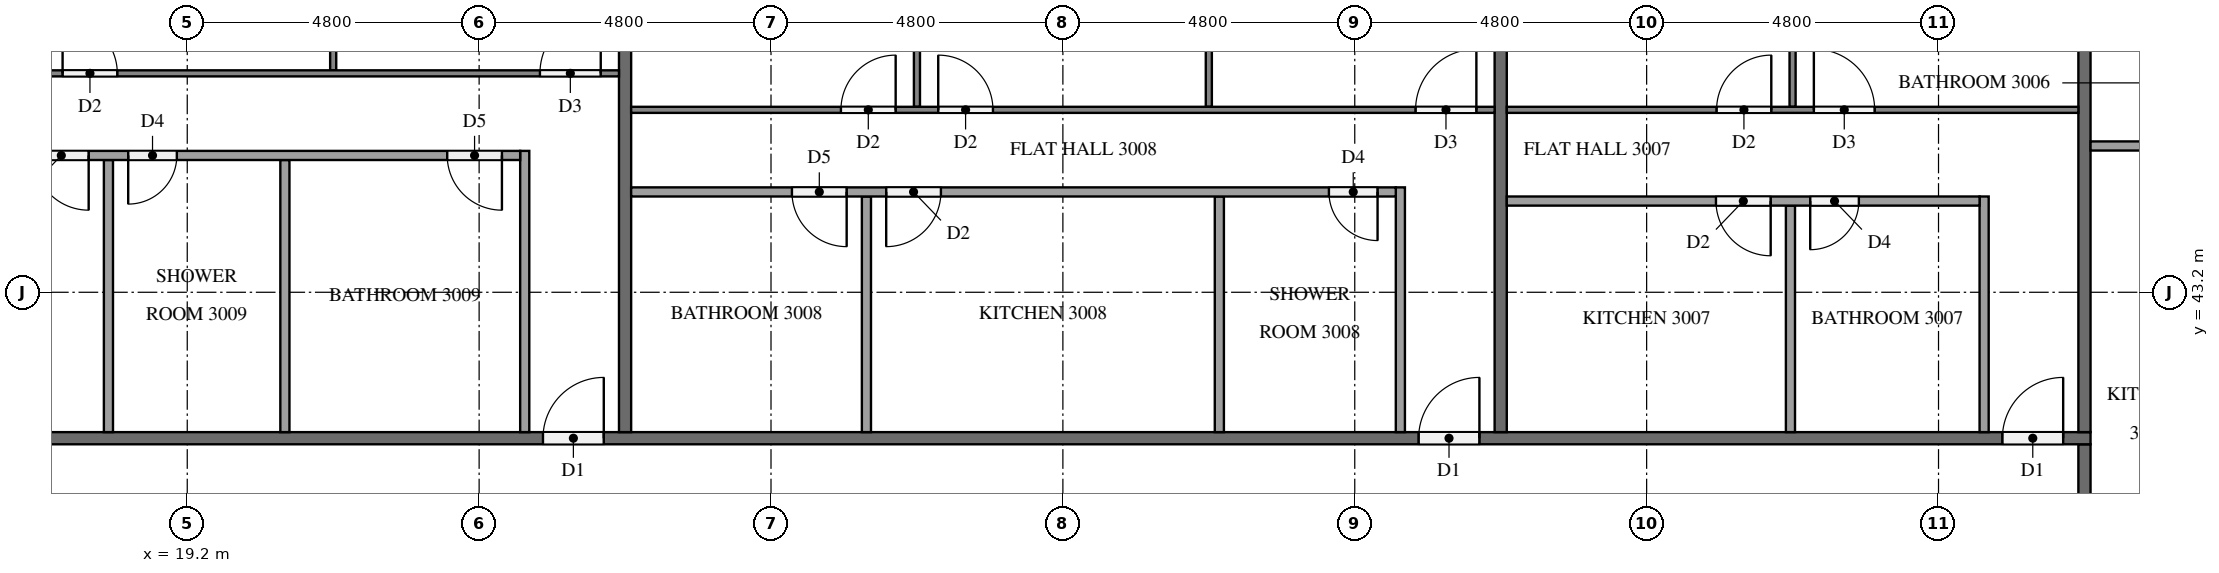
"""IFC4 building model, lengths in metres.
Left out: names, types, materials, properties, quantities, classifications, styles, units other than length and angle.
Written with IfcOpenShell. Run it as: python <this file> out.ifc"""

import sys

from ifc_helpers import new_model, si_unit, direction, frame, frame_2d, origin, place, context, subcontext, project, spatial, rectangle, extrude, element, fill, save


model = new_model("IFC4")
c1 = context("Model", 3, precision=1e-05, world=origin(), true_north=direction((0.0, 1.0)))
c2 = subcontext(c1, "Body", "Model", "MODEL_VIEW")
j1 = project(units=[si_unit("LENGTHUNIT", "METRE"), si_unit("PLANEANGLEUNIT", "RADIAN")], contexts=[c1])
p1 = place(None, origin())
s1 = spatial("IfcSite", under=j1, at=p1, CompositionType="ELEMENT")
p2 = place(p1, origin())
s2 = spatial("IfcBuilding", under=s1, at=p2, CompositionType="ELEMENT")
p3 = place(p2, frame((0.0, 0.0, 119.1)))
s3 = spatial("IfcBuildingStorey", under=s2, at=p3, CompositionType="ELEMENT", Elevation=119.1)
p4 = place(p3, frame((50.4, 40.7, 0.0), z_axis=(0.0, 0.0, 1.0), x_axis=(0.0, -1.0, 0.0)))
e1 = element("IfcWall", 1, at=p4, inside=s3, PredefinedType="PARTITIONING", context=c2, shape_type="SweptSolid", body=[
    extrude(rectangle(XDim=2.8, YDim=0.2, at=frame_2d((1.4, 0.0))), origin(), (0.0, 0.0, 1.0), 3.2),
])
p5 = place(p4, frame((1.55, 0.0, 0.0)))
e2 = element("IfcOpeningElement", 2, at=p5, cuts=e1, PredefinedType="OPENING", context=c2, shape_type="SweptSolid", body=[
    extrude(rectangle(XDim=1.0, YDim=2.1, at=frame_2d((0.5, 1.05))), frame((0.0, 0.11, 0.0), z_axis=(0.0, -1.0, 0.0), x_axis=(1.0, 0.0, 0.0)), (0.0, 0.0, 1.0), 0.22),
])
p6 = place(p3, frame((11.9, 40.8, 0.0), z_axis=(0.0, 0.0, 1.0), x_axis=(1.0, 0.0, 0.0)))
e3 = element("IfcWall", 3, at=p6, inside=s3, PredefinedType="PARTITIONING", context=c2, shape_type="SweptSolid", body=[
    extrude(rectangle(XDim=38.6, YDim=0.2, at=frame_2d((19.3, 0.0))), origin(), (0.0, 0.0, 1.0), 3.2),
])
p7 = place(p6, frame((37.15, 0.0, 0.0)))
e4 = element("IfcOpeningElement", 4, at=p7, cuts=e3, PredefinedType="OPENING", context=c2, shape_type="SweptSolid", body=[
    extrude(rectangle(XDim=1.0, YDim=2.1, at=frame_2d((0.5, 1.05))), frame((0.0, 0.11, 0.0), z_axis=(0.0, -1.0, 0.0), x_axis=(1.0, 0.0, 0.0)), (0.0, 0.0, 1.0), 0.22),
])
p8 = place(p6, frame((27.55, 0.0, 0.0)))
e5 = element("IfcOpeningElement", 5, at=p8, cuts=e3, PredefinedType="OPENING", context=c2, shape_type="SweptSolid", body=[
    extrude(rectangle(XDim=1.0, YDim=2.1, at=frame_2d((0.5, 1.05))), frame((0.0, 0.11, 0.0), z_axis=(0.0, -1.0, 0.0), x_axis=(1.0, 0.0, 0.0)), (0.0, 0.0, 1.0), 0.22),
])
p9 = place(p6, frame((13.15, 0.0, 0.0)))
e6 = element("IfcOpeningElement", 6, at=p9, cuts=e3, PredefinedType="OPENING", context=c2, shape_type="SweptSolid", body=[
    extrude(rectangle(XDim=1.0, YDim=2.1, at=frame_2d((0.5, 1.05))), frame((0.0, 0.11, 0.0), z_axis=(0.0, -1.0, 0.0), x_axis=(1.0, 0.0, 0.0)), (0.0, 0.0, 1.0), 0.22),
])
for number, where, z_axis, x_axis in (
    (7, (50.4, 40.9, 0.0), (0.0, 0.0, 1.0), (0.0, 1.0, 0.0)),
    (8, (40.8, 52.7, 0.0), (0.0, 0.0, 1.0), (0.0, -1.0, 0.0)),
    (9, (26.4, 52.7, 0.0), (0.0, 0.0, 1.0), (0.0, -1.0, 0.0)),
):
    element("IfcWall", number, at=place(p3, frame(where, z_axis=z_axis, x_axis=x_axis)), inside=s3, PredefinedType="PARTITIONING", context=c2, shape_type="SweptSolid", body=[
        extrude(rectangle(XDim=11.8, YDim=0.2, at=frame_2d((5.9, 0.0))), origin(), (0.0, 0.0, 1.0), 3.2),
    ])
p10 = place(p3, frame((50.5, 45.606, 0.0), z_axis=(0.0, 0.0, 1.0), x_axis=(1.0, 0.0, 0.0)))
e10 = element("IfcWall", 10, at=p10, inside=s3, PredefinedType="PARTITIONING", context=c2, shape_type="SweptSolid", body=[
    extrude(rectangle(XDim=1.925, YDim=0.15, at=frame_2d((0.962, 0.0))), origin(), (0.0, 0.0, 1.0), 3.2),
])
p11 = place(p3, frame((45.6, 46.25, 0.0), z_axis=(0.0, 0.0, 1.0), x_axis=(0.0, 1.0, 0.0)))
e11 = element("IfcWall", 11, at=p11, inside=s3, PredefinedType="PARTITIONING", context=c2, shape_type="SweptSolid", body=[
    extrude(rectangle(XDim=6.45, YDim=0.1, at=frame_2d((3.225, 0.0))), origin(), (0.0, 0.0, 1.0), 3.2),
])
p12 = place(p3, frame((40.9, 46.2, 0.0), z_axis=(0.0, 0.0, 1.0), x_axis=(1.0, 0.0, 0.0)))
e12 = element("IfcWall", 12, at=p12, inside=s3, PredefinedType="PARTITIONING", context=c2, shape_type="SweptSolid", body=[
    extrude(rectangle(XDim=9.4, YDim=0.1, at=frame_2d((4.7, 0.0))), origin(), (0.0, 0.0, 1.0), 3.2),
])
p13 = place(p12, frame((5.05, 0.0, 0.0)))
e13 = element("IfcOpeningElement", 13, at=p13, cuts=e12, PredefinedType="OPENING", context=c2, shape_type="SweptSolid", body=[
    extrude(rectangle(XDim=1.0, YDim=2.1, at=frame_2d((0.5, 1.05))), frame((0.0, 0.06, 0.0), z_axis=(0.0, -1.0, 0.0), x_axis=(1.0, 0.0, 0.0)), (0.0, 0.0, 1.0), 0.12),
])
p14 = place(p12, frame((3.45, 0.0, 0.0)))
e14 = element("IfcOpeningElement", 14, at=p14, cuts=e12, PredefinedType="OPENING", context=c2, shape_type="SweptSolid", body=[
    extrude(rectangle(XDim=0.9, YDim=2.1, at=frame_2d((0.45, 1.05))), frame((0.0, 0.06, 0.0), z_axis=(0.0, -1.0, 0.0), x_axis=(1.0, 0.0, 0.0)), (0.0, 0.0, 1.0), 0.12),
])
p15 = place(p3, frame((45.565, 40.9, 0.0), z_axis=(0.0, 0.0, 1.0), x_axis=(0.0, 1.0, 0.0)))
e15 = element("IfcWall", 15, at=p15, inside=s3, PredefinedType="PARTITIONING", context=c2, shape_type="SweptSolid", body=[
    extrude(rectangle(XDim=3.725, YDim=0.15, at=frame_2d((1.863, 0.0))), origin(), (0.0, 0.0, 1.0), 3.2),
])
p16 = place(p3, frame((48.75, 40.9, 0.0), z_axis=(0.0, 0.0, 1.0), x_axis=(0.0, 1.0, 0.0)))
e16 = element("IfcWall", 16, at=p16, inside=s3, PredefinedType="PARTITIONING", context=c2, shape_type="SweptSolid", body=[
    extrude(rectangle(XDim=3.875, YDim=0.15, at=frame_2d((1.938, 0.0))), origin(), (0.0, 0.0, 1.0), 3.2),
])
p17 = place(p3, frame((48.675, 44.7, 0.0), z_axis=(0.0, 0.0, 1.0), x_axis=(-1.0, 0.0, 0.0)))
e17 = element("IfcWall", 17, at=p17, inside=s3, PredefinedType="PARTITIONING", context=c2, shape_type="SweptSolid", body=[
    extrude(rectangle(XDim=7.775, YDim=0.15, at=frame_2d((3.888, 0.0))), origin(), (0.0, 0.0, 1.0), 3.2),
])
p18 = place(p17, frame((1.985, 0.0, 0.0)))
e18 = element("IfcOpeningElement", 18, at=p18, cuts=e17, PredefinedType="OPENING", context=c2, shape_type="SweptSolid", body=[
    extrude(rectangle(XDim=0.8, YDim=2.1, at=frame_2d((0.4, 1.05))), frame((0.0, 0.085, 0.0), z_axis=(0.0, -1.0, 0.0), x_axis=(1.0, 0.0, 0.0)), (0.0, 0.0, 1.0), 0.17),
])
p19 = place(p17, frame((3.435, 0.0, 0.0)))
e19 = element("IfcOpeningElement", 19, at=p19, cuts=e17, PredefinedType="OPENING", context=c2, shape_type="SweptSolid", body=[
    extrude(rectangle(XDim=0.9, YDim=2.1, at=frame_2d((0.45, 1.05))), frame((0.0, 0.085, 0.0), z_axis=(0.0, -1.0, 0.0), x_axis=(1.0, 0.0, 0.0)), (0.0, 0.0, 1.0), 0.17),
])
for number, where, z_axis, x_axis in (
    (20, (36.0, 46.25, 0.0), (0.0, 0.0, 1.0), (0.0, 1.0, 0.0)),
    (21, (31.2, 46.25, 0.0), (0.0, 0.0, 1.0), (0.0, 1.0, 0.0)),
):
    element("IfcWall", number, at=place(p3, frame(where, z_axis=z_axis, x_axis=x_axis)), inside=s3, PredefinedType="PARTITIONING", context=c2, shape_type="SweptSolid", body=[
        extrude(rectangle(XDim=6.45, YDim=0.1, at=frame_2d((3.225, 0.0))), origin(), (0.0, 0.0, 1.0), 3.2),
    ])
p20 = place(p3, frame((26.5, 46.2, 0.0), z_axis=(0.0, 0.0, 1.0), x_axis=(1.0, 0.0, 0.0)))
e22 = element("IfcWall", 22, at=p20, inside=s3, PredefinedType="PARTITIONING", context=c2, shape_type="SweptSolid", body=[
    extrude(rectangle(XDim=14.2, YDim=0.1, at=frame_2d((7.1, 0.0))), origin(), (0.0, 0.0, 1.0), 3.2),
])
p21 = place(p20, frame((12.9, 0.0, 0.0)))
e23 = element("IfcOpeningElement", 23, at=p21, cuts=e22, PredefinedType="OPENING", context=c2, shape_type="SweptSolid", body=[
    extrude(rectangle(XDim=1.0, YDim=2.1, at=frame_2d((0.5, 1.05))), frame((0.0, 0.06, 0.0), z_axis=(0.0, -1.0, 0.0), x_axis=(1.0, 0.0, 0.0)), (0.0, 0.0, 1.0), 0.12),
])
p22 = place(p20, frame((5.05, 0.0, 0.0)))
e24 = element("IfcOpeningElement", 24, at=p22, cuts=e22, PredefinedType="OPENING", context=c2, shape_type="SweptSolid", body=[
    extrude(rectangle(XDim=0.9, YDim=2.1, at=frame_2d((0.45, 1.05))), frame((0.0, 0.06, 0.0), z_axis=(0.0, -1.0, 0.0), x_axis=(1.0, 0.0, 0.0)), (0.0, 0.0, 1.0), 0.12),
])
p23 = place(p20, frame((3.45, 0.0, 0.0)))
e25 = element("IfcOpeningElement", 25, at=p23, cuts=e22, PredefinedType="OPENING", context=c2, shape_type="SweptSolid", body=[
    extrude(rectangle(XDim=0.9, YDim=2.1, at=frame_2d((0.45, 1.05))), frame((0.0, 0.06, 0.0), z_axis=(0.0, -1.0, 0.0), x_axis=(1.0, 0.0, 0.0)), (0.0, 0.0, 1.0), 0.12),
])
for number, where, z_axis, x_axis in (
    (26, (36.173, 40.9, 0.0), (0.0, 0.0, 1.0), (0.0, 1.0, 0.0)),
    (27, (30.369, 40.9, 0.0), (0.0, 0.0, 1.0), (0.0, 1.0, 0.0)),
):
    element("IfcWall", number, at=place(p3, frame(where, z_axis=z_axis, x_axis=x_axis)), inside=s3, PredefinedType="PARTITIONING", context=c2, shape_type="SweptSolid", body=[
        extrude(rectangle(XDim=3.875, YDim=0.15, at=frame_2d((1.938, 0.0))), origin(), (0.0, 0.0, 1.0), 3.2),
    ])
p24 = place(p3, frame((39.15, 40.9, 0.0), z_axis=(0.0, 0.0, 1.0), x_axis=(0.0, 1.0, 0.0)))
e28 = element("IfcWall", 28, at=p24, inside=s3, PredefinedType="PARTITIONING", context=c2, shape_type="SweptSolid", body=[
    extrude(rectangle(XDim=4.025, YDim=0.15, at=frame_2d((2.013, 0.0))), origin(), (0.0, 0.0, 1.0), 3.2),
])
p25 = place(p3, frame((39.075, 44.85, 0.0), z_axis=(0.0, 0.0, 1.0), x_axis=(-1.0, 0.0, 0.0)))
e29 = element("IfcWall", 29, at=p25, inside=s3, PredefinedType="PARTITIONING", context=c2, shape_type="SweptSolid", body=[
    extrude(rectangle(XDim=12.575, YDim=0.15, at=frame_2d((6.288, 0.0))), origin(), (0.0, 0.0, 1.0), 3.2),
])
p26 = place(p25, frame((0.3, 0.0, 0.0)))
e30 = element("IfcOpeningElement", 30, at=p26, cuts=e29, PredefinedType="OPENING", context=c2, shape_type="SweptSolid", body=[
    extrude(rectangle(XDim=0.8, YDim=2.1, at=frame_2d((0.4, 1.05))), frame((0.0, 0.085, 0.0), z_axis=(0.0, -1.0, 0.0), x_axis=(1.0, 0.0, 0.0)), (0.0, 0.0, 1.0), 0.17),
])
p27 = place(p25, frame((7.481, 0.0, 0.0)))
e31 = element("IfcOpeningElement", 31, at=p27, cuts=e29, PredefinedType="OPENING", context=c2, shape_type="SweptSolid", body=[
    extrude(rectangle(XDim=0.9, YDim=2.1, at=frame_2d((0.45, 1.05))), frame((0.0, 0.085, 0.0), z_axis=(0.0, -1.0, 0.0), x_axis=(1.0, 0.0, 0.0)), (0.0, 0.0, 1.0), 0.17),
])
p28 = place(p25, frame((9.031, 0.0, 0.0)))
e32 = element("IfcOpeningElement", 32, at=p28, cuts=e29, PredefinedType="OPENING", context=c2, shape_type="SweptSolid", body=[
    extrude(rectangle(XDim=0.9, YDim=2.1, at=frame_2d((0.45, 1.05))), frame((0.0, 0.085, 0.0), z_axis=(0.0, -1.0, 0.0), x_axis=(1.0, 0.0, 0.0)), (0.0, 0.0, 1.0), 0.17),
])
p29 = place(p3, frame((21.6, 46.85, 0.0), z_axis=(0.0, 0.0, 1.0), x_axis=(0.0, 1.0, 0.0)))
e33 = element("IfcWall", 33, at=p29, inside=s3, PredefinedType="PARTITIONING", context=c2, shape_type="SweptSolid", body=[
    extrude(rectangle(XDim=5.85, YDim=0.1, at=frame_2d((2.925, 0.0))), origin(), (0.0, 0.0, 1.0), 3.2),
])
p30 = place(p3, frame((12.1, 46.8, 0.0), z_axis=(0.0, 0.0, 1.0), x_axis=(1.0, 0.0, 0.0)))
e34 = element("IfcWall", 34, at=p30, inside=s3, PredefinedType="PARTITIONING", context=c2, shape_type="SweptSolid", body=[
    extrude(rectangle(XDim=14.2, YDim=0.1, at=frame_2d((7.1, 0.0))), origin(), (0.0, 0.0, 1.0), 3.2),
])
p31 = place(p30, frame((12.9, 0.0, 0.0)))
e35 = element("IfcOpeningElement", 35, at=p31, cuts=e34, PredefinedType="OPENING", context=c2, shape_type="SweptSolid", body=[
    extrude(rectangle(XDim=1.0, YDim=2.1, at=frame_2d((0.5, 1.05))), frame((0.0, 0.06, 0.0), z_axis=(0.0, -1.0, 0.0), x_axis=(1.0, 0.0, 0.0)), (0.0, 0.0, 1.0), 0.12),
])
p32 = place(p30, frame((5.05, 0.0, 0.0)))
e36 = element("IfcOpeningElement", 36, at=p32, cuts=e34, PredefinedType="OPENING", context=c2, shape_type="SweptSolid", body=[
    extrude(rectangle(XDim=0.9, YDim=2.1, at=frame_2d((0.45, 1.05))), frame((0.0, 0.06, 0.0), z_axis=(0.0, -1.0, 0.0), x_axis=(1.0, 0.0, 0.0)), (0.0, 0.0, 1.0), 0.12),
])
p33 = place(p30, frame((3.45, 0.0, 0.0)))
e37 = element("IfcOpeningElement", 37, at=p33, cuts=e34, PredefinedType="OPENING", context=c2, shape_type="SweptSolid", body=[
    extrude(rectangle(XDim=0.9, YDim=2.1, at=frame_2d((0.45, 1.05))), frame((0.0, 0.06, 0.0), z_axis=(0.0, -1.0, 0.0), x_axis=(1.0, 0.0, 0.0)), (0.0, 0.0, 1.0), 0.12),
])
for number, where, z_axis, x_axis in (
    (38, (20.806, 40.9, 0.0), (0.0, 0.0, 1.0), (0.0, 1.0, 0.0)),
    (39, (17.904, 40.9, 0.0), (0.0, 0.0, 1.0), (0.0, 1.0, 0.0)),
):
    element("IfcWall", number, at=place(p3, frame(where, z_axis=z_axis, x_axis=x_axis)), inside=s3, PredefinedType="PARTITIONING", context=c2, shape_type="SweptSolid", body=[
        extrude(rectangle(XDim=4.475, YDim=0.15, at=frame_2d((2.238, 0.0))), origin(), (0.0, 0.0, 1.0), 3.2),
    ])
p34 = place(p3, frame((24.75, 40.9, 0.0), z_axis=(0.0, 0.0, 1.0), x_axis=(0.0, 1.0, 0.0)))
e40 = element("IfcWall", 40, at=p34, inside=s3, PredefinedType="PARTITIONING", context=c2, shape_type="SweptSolid", body=[
    extrude(rectangle(XDim=4.625, YDim=0.15, at=frame_2d((2.312, 0.0))), origin(), (0.0, 0.0, 1.0), 3.2),
])
p35 = place(p3, frame((24.675, 45.45, 0.0), z_axis=(0.0, 0.0, 1.0), x_axis=(-1.0, 0.0, 0.0)))
e41 = element("IfcWall", 41, at=p35, inside=s3, PredefinedType="PARTITIONING", context=c2, shape_type="SweptSolid", body=[
    extrude(rectangle(XDim=12.575, YDim=0.15, at=frame_2d((6.288, 0.0))), origin(), (0.0, 0.0, 1.0), 3.2),
])
p36 = place(p35, frame((0.3, 0.0, 0.0)))
e42 = element("IfcOpeningElement", 42, at=p36, cuts=e41, PredefinedType="OPENING", context=c2, shape_type="SweptSolid", body=[
    extrude(rectangle(XDim=0.9, YDim=2.1, at=frame_2d((0.45, 1.05))), frame((0.0, 0.085, 0.0), z_axis=(0.0, -1.0, 0.0), x_axis=(1.0, 0.0, 0.0)), (0.0, 0.0, 1.0), 0.17),
])
p37 = place(p35, frame((5.646, 0.0, 0.0)))
e43 = element("IfcOpeningElement", 43, at=p37, cuts=e41, PredefinedType="OPENING", context=c2, shape_type="SweptSolid", body=[
    extrude(rectangle(XDim=0.8, YDim=2.1, at=frame_2d((0.4, 1.05))), frame((0.0, 0.085, 0.0), z_axis=(0.0, -1.0, 0.0), x_axis=(1.0, 0.0, 0.0)), (0.0, 0.0, 1.0), 0.17),
])
p38 = place(p35, frame((7.096, 0.0, 0.0)))
e44 = element("IfcOpeningElement", 44, at=p38, cuts=e41, PredefinedType="OPENING", context=c2, shape_type="SweptSolid", body=[
    extrude(rectangle(XDim=0.9, YDim=2.1, at=frame_2d((0.45, 1.05))), frame((0.0, 0.085, 0.0), z_axis=(0.0, -1.0, 0.0), x_axis=(1.0, 0.0, 0.0)), (0.0, 0.0, 1.0), 0.17),
])
p39 = place(p7, origin())
e45 = element("IfcDoor", 45, at=p39, inside=s3, OperationType="SINGLE_SWING_RIGHT", PredefinedType="DOOR", context=c2, shape_type="SweptSolid", body=[
    extrude(rectangle(XDim=1.0, YDim=2.1, at=frame_2d((0.5, 1.05))), frame((0.0, 0.025, 0.0), z_axis=(0.0, -1.0, 0.0), x_axis=(1.0, 0.0, 0.0)), (0.0, 0.0, 1.0), 0.05),
])
fill(e4, e45)
p40 = place(p8, origin())
e46 = element("IfcDoor", 46, at=p40, inside=s3, OperationType="SINGLE_SWING_RIGHT", PredefinedType="DOOR", context=c2, shape_type="SweptSolid", body=[
    extrude(rectangle(XDim=1.0, YDim=2.1, at=frame_2d((0.5, 1.05))), frame((0.0, 0.025, 0.0), z_axis=(0.0, -1.0, 0.0), x_axis=(1.0, 0.0, 0.0)), (0.0, 0.0, 1.0), 0.05),
])
fill(e5, e46)
p41 = place(p9, origin())
e47 = element("IfcDoor", 47, at=p41, inside=s3, OperationType="SINGLE_SWING_RIGHT", PredefinedType="DOOR", context=c2, shape_type="SweptSolid", body=[
    extrude(rectangle(XDim=1.0, YDim=2.1, at=frame_2d((0.5, 1.05))), frame((0.0, 0.025, 0.0), z_axis=(0.0, -1.0, 0.0), x_axis=(1.0, 0.0, 0.0)), (0.0, 0.0, 1.0), 0.05),
])
fill(e6, e47)
p42 = place(p13, origin())
e48 = element("IfcDoor", 48, at=p42, inside=s3, OperationType="SINGLE_SWING_LEFT", PredefinedType="DOOR", context=c2, shape_type="SweptSolid", body=[
    extrude(rectangle(XDim=1.0, YDim=2.1, at=frame_2d((0.5, 1.05))), frame((0.0, 0.025, 0.0), z_axis=(0.0, -1.0, 0.0), x_axis=(1.0, 0.0, 0.0)), (0.0, 0.0, 1.0), 0.05),
])
fill(e13, e48)
p43 = place(p14, origin())
e49 = element("IfcDoor", 49, at=p43, inside=s3, OperationType="SINGLE_SWING_RIGHT", PredefinedType="DOOR", context=c2, shape_type="SweptSolid", body=[
    extrude(rectangle(XDim=0.9, YDim=2.1, at=frame_2d((0.45, 1.05))), frame((0.0, 0.025, 0.0), z_axis=(0.0, -1.0, 0.0), x_axis=(1.0, 0.0, 0.0)), (0.0, 0.0, 1.0), 0.05),
])
fill(e14, e49)
p44 = place(p18, origin())
e50 = element("IfcDoor", 50, at=p44, inside=s3, OperationType="SINGLE_SWING_RIGHT", PredefinedType="DOOR", context=c2, shape_type="SweptSolid", body=[
    extrude(rectangle(XDim=0.8, YDim=2.1, at=frame_2d((0.4, 1.05))), frame((0.0, 0.025, 0.0), z_axis=(0.0, -1.0, 0.0), x_axis=(1.0, 0.0, 0.0)), (0.0, 0.0, 1.0), 0.05),
])
fill(e18, e50)
p45 = place(p19, origin())
e51 = element("IfcDoor", 51, at=p45, inside=s3, OperationType="SINGLE_SWING_LEFT", PredefinedType="DOOR", context=c2, shape_type="SweptSolid", body=[
    extrude(rectangle(XDim=0.9, YDim=2.1, at=frame_2d((0.45, 1.05))), frame((0.0, 0.025, 0.0), z_axis=(0.0, -1.0, 0.0), x_axis=(1.0, 0.0, 0.0)), (0.0, 0.0, 1.0), 0.05),
])
fill(e19, e51)
p46 = place(p21, origin())
e52 = element("IfcDoor", 52, at=p46, inside=s3, OperationType="SINGLE_SWING_RIGHT", PredefinedType="DOOR", context=c2, shape_type="SweptSolid", body=[
    extrude(rectangle(XDim=1.0, YDim=2.1, at=frame_2d((0.5, 1.05))), frame((0.0, 0.025, 0.0), z_axis=(0.0, -1.0, 0.0), x_axis=(1.0, 0.0, 0.0)), (0.0, 0.0, 1.0), 0.05),
])
fill(e23, e52)
p47 = place(p22, origin())
e53 = element("IfcDoor", 53, at=p47, inside=s3, OperationType="SINGLE_SWING_LEFT", PredefinedType="DOOR", context=c2, shape_type="SweptSolid", body=[
    extrude(rectangle(XDim=0.9, YDim=2.1, at=frame_2d((0.45, 1.05))), frame((0.0, 0.025, 0.0), z_axis=(0.0, -1.0, 0.0), x_axis=(1.0, 0.0, 0.0)), (0.0, 0.0, 1.0), 0.05),
])
fill(e24, e53)
p48 = place(p23, origin())
e54 = element("IfcDoor", 54, at=p48, inside=s3, OperationType="SINGLE_SWING_RIGHT", PredefinedType="DOOR", context=c2, shape_type="SweptSolid", body=[
    extrude(rectangle(XDim=0.9, YDim=2.1, at=frame_2d((0.45, 1.05))), frame((0.0, 0.025, 0.0), z_axis=(0.0, -1.0, 0.0), x_axis=(1.0, 0.0, 0.0)), (0.0, 0.0, 1.0), 0.05),
])
fill(e25, e54)
p49 = place(p26, origin())
e55 = element("IfcDoor", 55, at=p49, inside=s3, OperationType="SINGLE_SWING_LEFT", PredefinedType="DOOR", context=c2, shape_type="SweptSolid", body=[
    extrude(rectangle(XDim=0.8, YDim=2.1, at=frame_2d((0.4, 1.05))), frame((0.0, 0.025, 0.0), z_axis=(0.0, -1.0, 0.0), x_axis=(1.0, 0.0, 0.0)), (0.0, 0.0, 1.0), 0.05),
])
fill(e30, e55)
p50 = place(p27, origin())
e56 = element("IfcDoor", 56, at=p50, inside=s3, OperationType="SINGLE_SWING_RIGHT", PredefinedType="DOOR", context=c2, shape_type="SweptSolid", body=[
    extrude(rectangle(XDim=0.9, YDim=2.1, at=frame_2d((0.45, 1.05))), frame((0.0, 0.025, 0.0), z_axis=(0.0, -1.0, 0.0), x_axis=(1.0, 0.0, 0.0)), (0.0, 0.0, 1.0), 0.05),
])
fill(e31, e56)
p51 = place(p28, origin())
e57 = element("IfcDoor", 57, at=p51, inside=s3, OperationType="SINGLE_SWING_LEFT", PredefinedType="DOOR", context=c2, shape_type="SweptSolid", body=[
    extrude(rectangle(XDim=0.9, YDim=2.1, at=frame_2d((0.45, 1.05))), frame((0.0, 0.025, 0.0), z_axis=(0.0, -1.0, 0.0), x_axis=(1.0, 0.0, 0.0)), (0.0, 0.0, 1.0), 0.05),
])
fill(e32, e57)
p52 = place(p31, origin())
e58 = element("IfcDoor", 58, at=p52, inside=s3, OperationType="SINGLE_SWING_RIGHT", PredefinedType="DOOR", context=c2, shape_type="SweptSolid", body=[
    extrude(rectangle(XDim=1.0, YDim=2.1, at=frame_2d((0.5, 1.05))), frame((0.0, 0.025, 0.0), z_axis=(0.0, -1.0, 0.0), x_axis=(1.0, 0.0, 0.0)), (0.0, 0.0, 1.0), 0.05),
])
fill(e35, e58)
p53 = place(p32, origin())
e59 = element("IfcDoor", 59, at=p53, inside=s3, OperationType="SINGLE_SWING_LEFT", PredefinedType="DOOR", context=c2, shape_type="SweptSolid", body=[
    extrude(rectangle(XDim=0.9, YDim=2.1, at=frame_2d((0.45, 1.05))), frame((0.0, 0.025, 0.0), z_axis=(0.0, -1.0, 0.0), x_axis=(1.0, 0.0, 0.0)), (0.0, 0.0, 1.0), 0.05),
])
fill(e36, e59)
p54 = place(p36, origin())
e60 = element("IfcDoor", 60, at=p54, inside=s3, OperationType="SINGLE_SWING_LEFT", PredefinedType="DOOR", context=c2, shape_type="SweptSolid", body=[
    extrude(rectangle(XDim=0.9, YDim=2.1, at=frame_2d((0.45, 1.05))), frame((0.0, 0.025, 0.0), z_axis=(0.0, -1.0, 0.0), x_axis=(1.0, 0.0, 0.0)), (0.0, 0.0, 1.0), 0.05),
])
fill(e42, e60)
p55 = place(p37, origin())
e61 = element("IfcDoor", 61, at=p55, inside=s3, OperationType="SINGLE_SWING_RIGHT", PredefinedType="DOOR", context=c2, shape_type="SweptSolid", body=[
    extrude(rectangle(XDim=0.8, YDim=2.1, at=frame_2d((0.4, 1.05))), frame((0.0, 0.025, 0.0), z_axis=(0.0, -1.0, 0.0), x_axis=(1.0, 0.0, 0.0)), (0.0, 0.0, 1.0), 0.05),
])
fill(e43, e61)
p56 = place(p38, origin())
e62 = element("IfcDoor", 62, at=p56, inside=s3, OperationType="SINGLE_SWING_LEFT", PredefinedType="DOOR", context=c2, shape_type="SweptSolid", body=[
    extrude(rectangle(XDim=0.9, YDim=2.1, at=frame_2d((0.45, 1.05))), frame((0.0, 0.025, 0.0), z_axis=(0.0, -1.0, 0.0), x_axis=(1.0, 0.0, 0.0)), (0.0, 0.0, 1.0), 0.05),
])
fill(e44, e62)
save(model, sys.argv[1])
